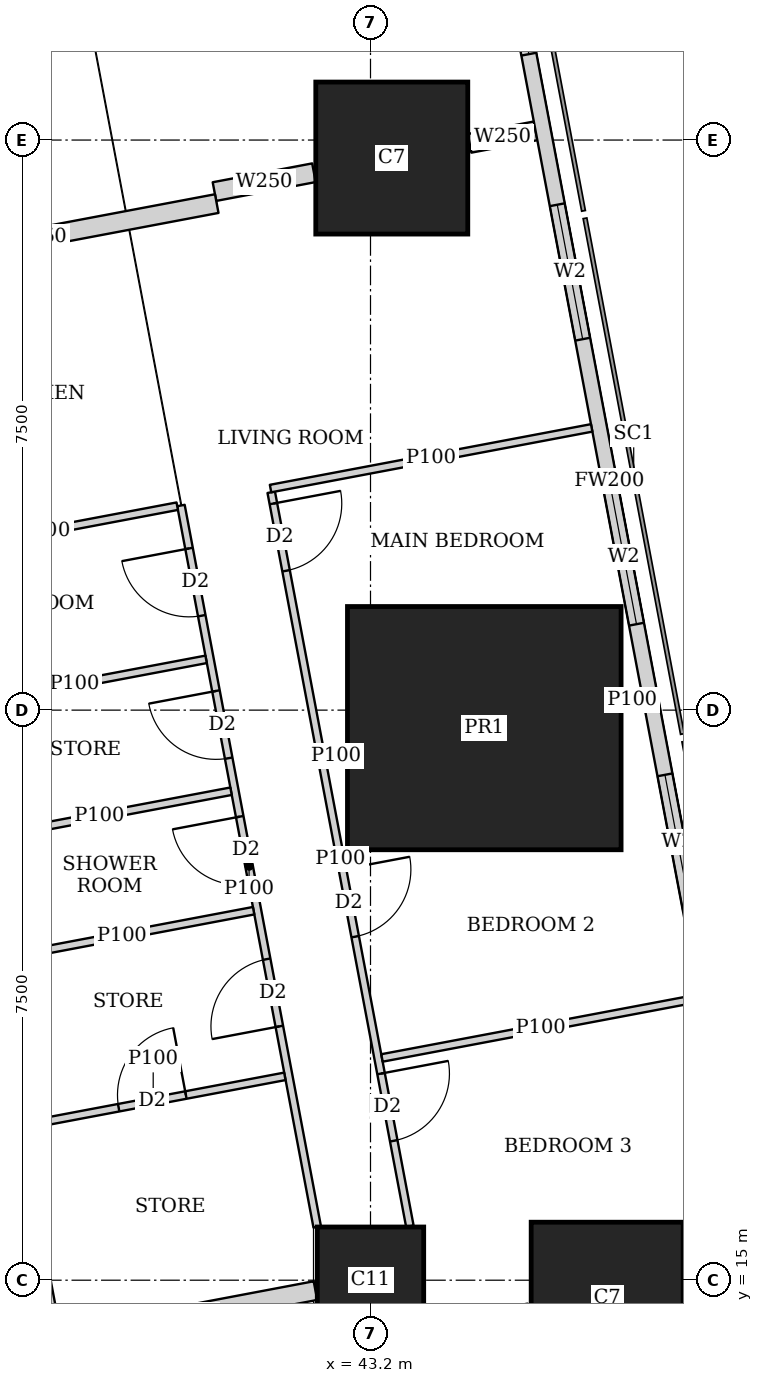
"""IFC4 building model, lengths in metres.
Left out: names, types, materials, properties, quantities, classifications, styles, units other than length and angle.
Written with IfcOpenShell. Run it as: python <this file> out.ifc"""

import sys

from ifc_helpers import new_model, si_unit, direction, frame, frame_2d, origin, origin_2d, place, context, subcontext, project, spatial, rectangle, extrude, element, fill, save


model = new_model("IFC4")
c1 = context("Model", 3, precision=1e-05, world=origin(), true_north=direction((0.0, 1.0)))
c2 = subcontext(c1, "Body", "Model", "MODEL_VIEW")
j1 = project(units=[si_unit("LENGTHUNIT", "METRE"), si_unit("PLANEANGLEUNIT", "RADIAN")], contexts=[c1])
p1 = place(None, origin())
s1 = spatial("IfcSite", under=j1, at=p1, CompositionType="ELEMENT")
p2 = place(p1, origin())
s2 = spatial("IfcBuilding", under=s1, at=p2, CompositionType="ELEMENT")
p3 = place(p2, frame((0.0, 0.0, 277.85)))
s3 = spatial("IfcBuildingStorey", under=s2, at=p3, CompositionType="ELEMENT", Elevation=277.85)
p4 = place(p3, frame((43.2, 15.0, 0.0), z_axis=(0.0, 0.0, 1.0), x_axis=(1.0, 0.0, 0.0)))
e1 = element("IfcColumn", 1, at=p4, inside=s3, PredefinedType="COLUMN", context=c2, shape_type="SweptSolid", body=[
    extrude(rectangle(XDim=1.4, YDim=1.4, at=origin_2d()), origin(), (0.0, 0.0, 1.0), 3.75),
])
p5 = place(p3, frame((46.314, 14.763, 0.0), z_axis=(0.0, 0.0, 1.0), x_axis=(1.0, 0.0, 0.0)))
e2 = element("IfcColumn", 2, at=p5, inside=s3, PredefinedType="COLUMN", context=c2, shape_type="SweptSolid", body=[
    extrude(rectangle(XDim=2.0, YDim=2.0, at=origin_2d()), origin(), (0.0, 0.0, 1.0), 3.75),
])
p6 = place(p3, frame((44.697, 22.263, 0.0), z_axis=(0.0, 0.0, 1.0), x_axis=(1.0, 0.0, 0.0)))
e3 = element("IfcColumn", 3, at=p6, inside=s3, PredefinedType="COLUMN", context=c2, shape_type="SweptSolid", body=[
    extrude(rectangle(XDim=3.6, YDim=3.2, at=origin_2d()), origin(), (0.0, 0.0, 1.0), 3.75),
])
p7 = place(p3, frame((43.48, 29.763, 0.0), z_axis=(0.0, 0.0, 1.0), x_axis=(1.0, 0.0, 0.0)))
e4 = element("IfcColumn", 4, at=p7, inside=s3, PredefinedType="COLUMN", context=c2, shape_type="SweptSolid", body=[
    extrude(rectangle(XDim=2.0, YDim=2.0, at=origin_2d()), origin(), (0.0, 0.0, 1.0), 3.75),
])
p8 = place(p3, frame((49.684, 7.832, 0.0), z_axis=(0.0, 0.0, 1.0), x_axis=(-0.185616669694, 0.982622232565, 0.0)))
e5 = element("IfcWall", 5, at=p8, inside=s3, PredefinedType="SOLIDWALL", context=c2, shape_type="SweptSolid", body=[
    extrude(rectangle(XDim=36.0, YDim=0.2, at=frame_2d((18.0, 0.0))), origin(), (0.0, 0.0, 1.0), 3.5),
])
p9 = place(p8, frame((2.518, 0.0, 0.9)))
e6 = element("IfcOpeningElement", 6, at=p9, cuts=e5, PredefinedType="OPENING", context=c2, shape_type="SweptSolid", body=[
    extrude(rectangle(XDim=2.4, YDim=1.5, at=frame_2d((1.2, 0.75))), frame((0.0, 0.11, 0.0), z_axis=(0.0, -1.0, 0.0), x_axis=(1.0, 0.0, 0.0)), (0.0, 0.0, 1.0), 0.22),
])
p10 = place(p8, frame((8.444, 0.0, 0.9)))
e7 = element("IfcOpeningElement", 7, at=p10, cuts=e5, PredefinedType="OPENING", context=c2, shape_type="SweptSolid", body=[
    extrude(rectangle(XDim=1.8, YDim=1.5, at=frame_2d((0.9, 0.75))), frame((0.0, 0.11, 0.0), z_axis=(0.0, -1.0, 0.0), x_axis=(1.0, 0.0, 0.0)), (0.0, 0.0, 1.0), 0.22),
])
p11 = place(p8, frame((12.261, 0.0, 0.9)))
e8 = element("IfcOpeningElement", 8, at=p11, cuts=e5, PredefinedType="OPENING", context=c2, shape_type="SweptSolid", body=[
    extrude(rectangle(XDim=1.8, YDim=1.5, at=frame_2d((0.9, 0.75))), frame((0.0, 0.11, 0.0), z_axis=(0.0, -1.0, 0.0), x_axis=(1.0, 0.0, 0.0)), (0.0, 0.0, 1.0), 0.22),
])
p12 = place(p8, frame((16.078, 0.0, 0.9)))
e9 = element("IfcOpeningElement", 9, at=p12, cuts=e5, PredefinedType="OPENING", context=c2, shape_type="SweptSolid", body=[
    extrude(rectangle(XDim=1.8, YDim=1.5, at=frame_2d((0.9, 0.75))), frame((0.0, 0.11, 0.0), z_axis=(0.0, -1.0, 0.0), x_axis=(1.0, 0.0, 0.0)), (0.0, 0.0, 1.0), 0.22),
])
p13 = place(p8, frame((19.894, 0.0, 0.9)))
e10 = element("IfcOpeningElement", 10, at=p13, cuts=e5, PredefinedType="OPENING", context=c2, shape_type="SweptSolid", body=[
    extrude(rectangle(XDim=1.8, YDim=1.5, at=frame_2d((0.9, 0.75))), frame((0.0, 0.11, 0.0), z_axis=(0.0, -1.0, 0.0), x_axis=(1.0, 0.0, 0.0)), (0.0, 0.0, 1.0), 0.22),
])
p14 = place(p8, frame((23.71, 0.0, 0.9)))
e11 = element("IfcOpeningElement", 11, at=p14, cuts=e5, PredefinedType="OPENING", context=c2, shape_type="SweptSolid", body=[
    extrude(rectangle(XDim=1.8, YDim=1.5, at=frame_2d((0.9, 0.75))), frame((0.0, 0.11, 0.0), z_axis=(0.0, -1.0, 0.0), x_axis=(1.0, 0.0, 0.0)), (0.0, 0.0, 1.0), 0.22),
])
p15 = place(p8, frame((27.526, 0.0, 0.9)))
e12 = element("IfcOpeningElement", 12, at=p15, cuts=e5, PredefinedType="OPENING", context=c2, shape_type="SweptSolid", body=[
    extrude(rectangle(XDim=1.8, YDim=1.5, at=frame_2d((0.9, 0.75))), frame((0.0, 0.11, 0.0), z_axis=(0.0, -1.0, 0.0), x_axis=(1.0, 0.0, 0.0)), (0.0, 0.0, 1.0), 0.22),
])
p16 = place(p8, frame((32.046, 0.0, 0.9)))
e13 = element("IfcOpeningElement", 13, at=p16, cuts=e5, PredefinedType="OPENING", context=c2, shape_type="SweptSolid", body=[
    extrude(rectangle(XDim=1.8, YDim=1.5, at=frame_2d((0.9, 0.75))), frame((0.0, 0.11, 0.0), z_axis=(0.0, -1.0, 0.0), x_axis=(1.0, 0.0, 0.0)), (0.0, 0.0, 1.0), 0.22),
])
p17 = place(p3, frame((33.781, 42.186, 0.0), z_axis=(0.0, 0.0, 1.0), x_axis=(0.185593518645, -0.9826266055, 0.0)))
e14 = element("IfcWall", 14, at=p17, inside=s3, PredefinedType="SOLIDWALL", context=c2, shape_type="SweptSolid", body=[
    extrude(rectangle(XDim=35.961, YDim=0.15, at=frame_2d((17.98, 0.0))), origin(), (0.0, 0.0, 1.0), 2.5),
])
p18 = place(p17, frame((11.76, 0.0, 0.0)))
e15 = element("IfcOpeningElement", 15, at=p18, cuts=e14, PredefinedType="OPENING", context=c2, shape_type="SweptSolid", body=[
    extrude(rectangle(XDim=1.0, YDim=2.1, at=frame_2d((0.5, 1.05))), frame((0.0, 0.085, 0.0), z_axis=(0.0, -1.0, 0.0), x_axis=(1.0, 0.0, 0.0)), (0.0, 0.0, 1.0), 0.17),
])
p19 = place(p17, frame((15.576, 0.0, 0.0)))
e16 = element("IfcOpeningElement", 16, at=p19, cuts=e14, PredefinedType="OPENING", context=c2, shape_type="SweptSolid", body=[
    extrude(rectangle(XDim=1.0, YDim=2.1, at=frame_2d((0.5, 1.05))), frame((0.0, 0.085, 0.0), z_axis=(0.0, -1.0, 0.0), x_axis=(1.0, 0.0, 0.0)), (0.0, 0.0, 1.0), 0.17),
])
p20 = place(p17, frame((30.502, 0.0, 0.0)))
e17 = element("IfcOpeningElement", 17, at=p20, cuts=e14, PredefinedType="OPENING", context=c2, shape_type="SweptSolid", body=[
    extrude(rectangle(XDim=1.0, YDim=2.1, at=frame_2d((0.5, 1.05))), frame((0.0, 0.085, 0.0), z_axis=(0.0, -1.0, 0.0), x_axis=(1.0, 0.0, 0.0)), (0.0, 0.0, 1.0), 0.17),
])
p21 = place(p3, frame((41.894, 25.366, 0.0), z_axis=(0.0, 0.0, 1.0), x_axis=(0.185612905165, -0.982622943675, 0.0)))
e18 = element("IfcWall", 18, at=p21, inside=s3, PredefinedType="PARTITIONING", context=c2, shape_type="SweptSolid", body=[
    extrude(rectangle(XDim=9.827, YDim=0.1, at=frame_2d((4.913, 0.0))), origin(), (0.0, 0.0, 1.0), 2.5),
])
p22 = place(p21, frame((0.151, 0.0, 0.0)))
e19 = element("IfcOpeningElement", 19, at=p22, cuts=e18, PredefinedType="OPENING", context=c2, shape_type="SweptSolid", body=[
    extrude(rectangle(XDim=0.9, YDim=2.1, at=frame_2d((0.45, 1.05))), frame((0.0, 0.06, 0.0), z_axis=(0.0, -1.0, 0.0), x_axis=(1.0, 0.0, 0.0)), (0.0, 0.0, 1.0), 0.12),
])
p23 = place(p21, frame((5.05, 0.0, 0.0)))
e20 = element("IfcOpeningElement", 20, at=p23, cuts=e18, PredefinedType="OPENING", context=c2, shape_type="SweptSolid", body=[
    extrude(rectangle(XDim=0.9, YDim=2.1, at=frame_2d((0.45, 1.05))), frame((0.0, 0.06, 0.0), z_axis=(0.0, -1.0, 0.0), x_axis=(1.0, 0.0, 0.0)), (0.0, 0.0, 1.0), 0.12),
])
p24 = place(p21, frame((7.783, 0.0, 0.0)))
e21 = element("IfcOpeningElement", 21, at=p24, cuts=e18, PredefinedType="OPENING", context=c2, shape_type="SweptSolid", body=[
    extrude(rectangle(XDim=0.9, YDim=2.1, at=frame_2d((0.45, 1.05))), frame((0.0, 0.06, 0.0), z_axis=(0.0, -1.0, 0.0), x_axis=(1.0, 0.0, 0.0)), (0.0, 0.0, 1.0), 0.12),
])
p25 = place(p3, frame((40.706, 25.192, 0.0), z_axis=(0.0, 0.0, 1.0), x_axis=(0.185629824463, -0.982619747547, 0.0)))
e22 = element("IfcWall", 22, at=p25, inside=s3, PredefinedType="PARTITIONING", context=c2, shape_type="SweptSolid", body=[
    extrude(rectangle(XDim=9.659, YDim=0.1, at=frame_2d((4.83, 0.0))), origin(), (0.0, 0.0, 1.0), 2.5),
])
p26 = place(p25, frame((0.575, 0.0, 0.0)))
e23 = element("IfcOpeningElement", 23, at=p26, cuts=e22, PredefinedType="OPENING", context=c2, shape_type="SweptSolid", body=[
    extrude(rectangle(XDim=0.9, YDim=2.1, at=frame_2d((0.45, 1.05))), frame((0.0, 0.06, 0.0), z_axis=(0.0, -1.0, 0.0), x_axis=(1.0, 0.0, 0.0)), (0.0, 0.0, 1.0), 0.12),
])
p27 = place(p25, frame((4.166, 0.0, 0.0)))
e24 = element("IfcOpeningElement", 24, at=p27, cuts=e22, PredefinedType="OPENING", context=c2, shape_type="SweptSolid", body=[
    extrude(rectangle(XDim=0.9, YDim=2.1, at=frame_2d((0.45, 1.05))), frame((0.0, 0.06, 0.0), z_axis=(0.0, -1.0, 0.0), x_axis=(1.0, 0.0, 0.0)), (0.0, 0.0, 1.0), 0.12),
])
p28 = place(p25, frame((2.483, 0.0, 0.0)))
e25 = element("IfcOpeningElement", 25, at=p28, cuts=e22, PredefinedType="OPENING", context=c2, shape_type="SweptSolid", body=[
    extrude(rectangle(XDim=0.9, YDim=2.1, at=frame_2d((0.45, 1.05))), frame((0.0, 0.06, 0.0), z_axis=(0.0, -1.0, 0.0), x_axis=(1.0, 0.0, 0.0)), (0.0, 0.0, 1.0), 0.12),
])
p29 = place(p25, frame((6.074, 0.0, 0.0)))
e26 = element("IfcOpeningElement", 26, at=p29, cuts=e22, PredefinedType="OPENING", context=c2, shape_type="SweptSolid", body=[
    extrude(rectangle(XDim=0.9, YDim=2.1, at=frame_2d((0.45, 1.05))), frame((0.0, 0.06, 0.0), z_axis=(0.0, -1.0, 0.0), x_axis=(1.0, 0.0, 0.0)), (0.0, 0.0, 1.0), 0.12),
])
p30 = place(p3, frame((46.11, 26.213, 0.0), z_axis=(0.0, 0.0, 1.0), x_axis=(-0.982633535512, -0.185556823879, 0.0)))
e27 = element("IfcWall", 27, at=p30, inside=s3, PredefinedType="PARTITIONING", context=c2, shape_type="SweptSolid", body=[
    extrude(rectangle(XDim=4.3, YDim=0.1, at=frame_2d((2.15, 0.0))), origin(), (0.0, 0.0, 1.0), 2.5),
])
p31 = place(p3, frame((46.782, 22.657, 0.0), z_axis=(0.0, 0.0, 1.0), x_axis=(-0.982574553168, -0.185868898601, 0.0)))
e28 = element("IfcWall", 28, at=p31, inside=s3, PredefinedType="PARTITIONING", context=c2, shape_type="SweptSolid", body=[
    extrude(rectangle(XDim=0.28, YDim=0.1, at=frame_2d((0.14, 0.0))), origin(), (0.0, 0.0, 1.0), 3.5),
])
p32 = place(p3, frame((42.887, 21.921, 0.0), z_axis=(0.0, 0.0, 1.0), x_axis=(-0.982688058078, -0.185267861514, 0.0)))
e29 = element("IfcWall", 29, at=p32, inside=s3, PredefinedType="PARTITIONING", context=c2, shape_type="SweptSolid", body=[
    extrude(rectangle(XDim=0.286, YDim=0.1, at=frame_2d((0.143, 0.0))), origin(), (0.0, 0.0, 1.0), 2.5),
])
p33 = place(p3, frame((47.527, 18.712, 0.0), z_axis=(0.0, 0.0, 1.0), x_axis=(-0.982665405803, -0.185387972203, 0.0)))
e30 = element("IfcWall", 30, at=p33, inside=s3, PredefinedType="PARTITIONING", context=c2, shape_type="SweptSolid", body=[
    extrude(rectangle(XDim=4.25, YDim=0.1, at=frame_2d((2.125, 0.0))), origin(), (0.0, 0.0, 1.0), 2.5),
])
p34 = place(p3, frame((40.657, 25.183, 0.0), z_axis=(0.0, 0.0, 1.0), x_axis=(-0.982585626838, -0.185810349366, 0.0)))
e31 = element("IfcWall", 31, at=p34, inside=s3, PredefinedType="PARTITIONING", context=c2, shape_type="SweptSolid", body=[
    extrude(rectangle(XDim=3.525, YDim=0.1, at=frame_2d((1.763, 0.0))), origin(), (0.0, 0.0, 1.0), 3.5),
])
p35 = place(p3, frame((41.365, 21.433, 0.0), z_axis=(0.0, 0.0, 1.0), x_axis=(-0.982638553676, -0.185530247748, 0.0)))
e32 = element("IfcWall", 32, at=p35, inside=s3, PredefinedType="PARTITIONING", context=c2, shape_type="SweptSolid", body=[
    extrude(rectangle(XDim=3.525, YDim=0.1, at=frame_2d((1.763, 0.0))), origin(), (0.0, 0.0, 1.0), 3.5),
])
p36 = place(p3, frame((42.073, 17.682, 0.0), z_axis=(0.0, 0.0, 1.0), x_axis=(-0.98265117712, -0.185463376723, 0.0)))
e33 = element("IfcWall", 33, at=p36, inside=s3, PredefinedType="PARTITIONING", context=c2, shape_type="SweptSolid", body=[
    extrude(rectangle(XDim=3.525, YDim=0.1, at=frame_2d((1.763, 0.0))), origin(), (0.0, 0.0, 1.0), 3.5),
])
p37 = place(p36, frame((1.325, 0.0, 0.0)))
e34 = element("IfcOpeningElement", 34, at=p37, cuts=e33, PredefinedType="OPENING", context=c2, shape_type="SweptSolid", body=[
    extrude(rectangle(XDim=0.9, YDim=2.1, at=frame_2d((0.45, 1.05))), frame((0.0, 0.06, 0.0), z_axis=(0.0, -1.0, 0.0), x_axis=(1.0, 0.0, 0.0)), (0.0, 0.0, 1.0), 0.12),
])
p38 = place(p3, frame((41.037, 23.168, 0.0), z_axis=(0.0, 0.0, 1.0), x_axis=(-0.982638553676, -0.185530247748, 0.0)))
e35 = element("IfcWall", 35, at=p38, inside=s3, PredefinedType="PARTITIONING", context=c2, shape_type="SweptSolid", body=[
    extrude(rectangle(XDim=3.525, YDim=0.1, at=frame_2d((1.763, 0.0))), origin(), (0.0, 0.0, 1.0), 2.5),
])
p39 = place(p3, frame((41.662, 19.861, 0.0), z_axis=(0.0, 0.0, 1.0), x_axis=(-0.982588017646, -0.185797706064, 0.0)))
e36 = element("IfcWall", 36, at=p39, inside=s3, PredefinedType="PARTITIONING", context=c2, shape_type="SweptSolid", body=[
    extrude(rectangle(XDim=3.525, YDim=0.1, at=frame_2d((1.763, 0.0))), origin(), (0.0, 0.0, 1.0), 3.5),
])
p40 = place(p3, frame((45.372, 30.121, 0.0), z_axis=(0.0, 0.0, 1.0), x_axis=(-0.982608419258, -0.185689780017, 0.0)))
e37 = element("IfcWall", 37, at=p40, inside=s3, PredefinedType="SOLIDWALL", context=c2, shape_type="SweptSolid", body=[
    extrude(rectangle(XDim=0.884, YDim=0.25, at=frame_2d((0.442, 0.0))), origin(), (0.0, 0.0, 1.0), 3.5),
])
p41 = place(p3, frame((42.456, 29.57, 0.0), z_axis=(0.0, 0.0, 1.0), x_axis=(-0.982517742323, -0.18616897169, 0.0)))
e38 = element("IfcWall", 38, at=p41, inside=s3, PredefinedType="SOLIDWALL", context=c2, shape_type="SweptSolid", body=[
    extrude(rectangle(XDim=1.332, YDim=0.25, at=frame_2d((0.666, 0.0))), origin(), (0.0, 0.0, 1.0), 2.5),
])
p42 = place(p3, frame((41.177, 29.164, 0.0), z_axis=(0.0, 0.0, 1.0), x_axis=(-0.982642846239, -0.185507511263, 0.0)))
e39 = element("IfcWall", 39, at=p42, inside=s3, PredefinedType="SOLIDWALL", context=c2, shape_type="SweptSolid", body=[
    extrude(rectangle(XDim=4.776, YDim=0.25, at=frame_2d((2.388, 0.0))), origin(), (0.0, 0.0, 1.0), 2.5),
])
p43 = place(p3, frame((42.476, 14.863, 0.0), z_axis=(0.0, 0.0, 1.0), x_axis=(-0.982603567712, -0.185715450942, 0.0)))
e40 = element("IfcWall", 40, at=p43, inside=s3, PredefinedType="SOLIDWALL", context=c2, shape_type="SweptSolid", body=[
    extrude(rectangle(XDim=3.398, YDim=0.25, at=frame_2d((1.699, 0.0))), origin(), (0.0, 0.0, 1.0), 3.5),
])
p44 = place(p11, origin())
e41 = element("IfcWindow", 41, at=p44, inside=s3, PartitioningType="SINGLE_PANEL", PredefinedType="WINDOW", context=c2, shape_type="SweptSolid", body=[
    extrude(rectangle(XDim=1.8, YDim=1.5, at=frame_2d((0.9, 0.75))), frame((0.0, 0.03, 0.0), z_axis=(0.0, -1.0, 0.0), x_axis=(1.0, 0.0, 0.0)), (0.0, 0.0, 1.0), 0.06),
])
fill(e8, e41)
p45 = place(p12, origin())
e42 = element("IfcWindow", 42, at=p45, inside=s3, PartitioningType="SINGLE_PANEL", PredefinedType="WINDOW", context=c2, shape_type="SweptSolid", body=[
    extrude(rectangle(XDim=1.8, YDim=1.5, at=frame_2d((0.9, 0.75))), frame((0.0, 0.03, 0.0), z_axis=(0.0, -1.0, 0.0), x_axis=(1.0, 0.0, 0.0)), (0.0, 0.0, 1.0), 0.06),
])
fill(e9, e42)
p46 = place(p13, origin())
e43 = element("IfcWindow", 43, at=p46, inside=s3, PartitioningType="SINGLE_PANEL", PredefinedType="WINDOW", context=c2, shape_type="SweptSolid", body=[
    extrude(rectangle(XDim=1.8, YDim=1.5, at=frame_2d((0.9, 0.75))), frame((0.0, 0.03, 0.0), z_axis=(0.0, -1.0, 0.0), x_axis=(1.0, 0.0, 0.0)), (0.0, 0.0, 1.0), 0.06),
])
fill(e10, e43)
p47 = place(p14, origin())
e44 = element("IfcWindow", 44, at=p47, inside=s3, PartitioningType="SINGLE_PANEL", PredefinedType="WINDOW", context=c2, shape_type="SweptSolid", body=[
    extrude(rectangle(XDim=1.8, YDim=1.5, at=frame_2d((0.9, 0.75))), frame((0.0, 0.03, 0.0), z_axis=(0.0, -1.0, 0.0), x_axis=(1.0, 0.0, 0.0)), (0.0, 0.0, 1.0), 0.06),
])
fill(e11, e44)
p48 = place(p22, origin())
e45 = element("IfcDoor", 45, at=p48, inside=s3, OperationType="SINGLE_SWING_LEFT", PredefinedType="DOOR", context=c2, shape_type="SweptSolid", body=[
    extrude(rectangle(XDim=0.9, YDim=2.1, at=frame_2d((0.45, 1.05))), frame((0.0, 0.025, 0.0), z_axis=(0.0, -1.0, 0.0), x_axis=(1.0, 0.0, 0.0)), (0.0, 0.0, 1.0), 0.05),
])
fill(e19, e45)
p49 = place(p23, origin())
e46 = element("IfcDoor", 46, at=p49, inside=s3, OperationType="SINGLE_SWING_LEFT", PredefinedType="DOOR", context=c2, shape_type="SweptSolid", body=[
    extrude(rectangle(XDim=0.9, YDim=2.1, at=frame_2d((0.45, 1.05))), frame((0.0, 0.025, 0.0), z_axis=(0.0, -1.0, 0.0), x_axis=(1.0, 0.0, 0.0)), (0.0, 0.0, 1.0), 0.05),
])
fill(e20, e46)
p50 = place(p24, origin())
e47 = element("IfcDoor", 47, at=p50, inside=s3, OperationType="SINGLE_SWING_LEFT", PredefinedType="DOOR", context=c2, shape_type="SweptSolid", body=[
    extrude(rectangle(XDim=0.9, YDim=2.1, at=frame_2d((0.45, 1.05))), frame((0.0, 0.025, 0.0), z_axis=(0.0, -1.0, 0.0), x_axis=(1.0, 0.0, 0.0)), (0.0, 0.0, 1.0), 0.05),
])
fill(e21, e47)
p51 = place(p26, origin())
e48 = element("IfcDoor", 48, at=p51, inside=s3, OperationType="SINGLE_SWING_RIGHT", PredefinedType="DOOR", context=c2, shape_type="SweptSolid", body=[
    extrude(rectangle(XDim=0.9, YDim=2.1, at=frame_2d((0.45, 1.05))), frame((0.0, 0.025, 0.0), z_axis=(0.0, -1.0, 0.0), x_axis=(1.0, 0.0, 0.0)), (0.0, 0.0, 1.0), 0.05),
])
fill(e23, e48)
p52 = place(p27, origin())
e49 = element("IfcDoor", 49, at=p52, inside=s3, OperationType="SINGLE_SWING_RIGHT", PredefinedType="DOOR", context=c2, shape_type="SweptSolid", body=[
    extrude(rectangle(XDim=0.9, YDim=2.1, at=frame_2d((0.45, 1.05))), frame((0.0, 0.025, 0.0), z_axis=(0.0, -1.0, 0.0), x_axis=(1.0, 0.0, 0.0)), (0.0, 0.0, 1.0), 0.05),
])
fill(e24, e49)
p53 = place(p28, origin())
e50 = element("IfcDoor", 50, at=p53, inside=s3, OperationType="SINGLE_SWING_RIGHT", PredefinedType="DOOR", context=c2, shape_type="SweptSolid", body=[
    extrude(rectangle(XDim=0.9, YDim=2.1, at=frame_2d((0.45, 1.05))), frame((0.0, 0.025, 0.0), z_axis=(0.0, -1.0, 0.0), x_axis=(1.0, 0.0, 0.0)), (0.0, 0.0, 1.0), 0.05),
])
fill(e25, e50)
p54 = place(p29, origin())
e51 = element("IfcDoor", 51, at=p54, inside=s3, OperationType="SINGLE_SWING_LEFT", PredefinedType="DOOR", context=c2, shape_type="SweptSolid", body=[
    extrude(rectangle(XDim=0.9, YDim=2.1, at=frame_2d((0.45, 1.05))), frame((0.0, 0.025, 0.0), z_axis=(0.0, -1.0, 0.0), x_axis=(1.0, 0.0, 0.0)), (0.0, 0.0, 1.0), 0.05),
])
fill(e26, e51)
p55 = place(p37, origin())
e52 = element("IfcDoor", 52, at=p55, inside=s3, OperationType="SINGLE_SWING_RIGHT", PredefinedType="DOOR", context=c2, shape_type="SweptSolid", body=[
    extrude(rectangle(XDim=0.9, YDim=2.1, at=frame_2d((0.45, 1.05))), frame((0.0, 0.025, 0.0), z_axis=(0.0, -1.0, 0.0), x_axis=(1.0, 0.0, 0.0)), (0.0, 0.0, 1.0), 0.05),
])
fill(e34, e52)
save(model, sys.argv[1])
